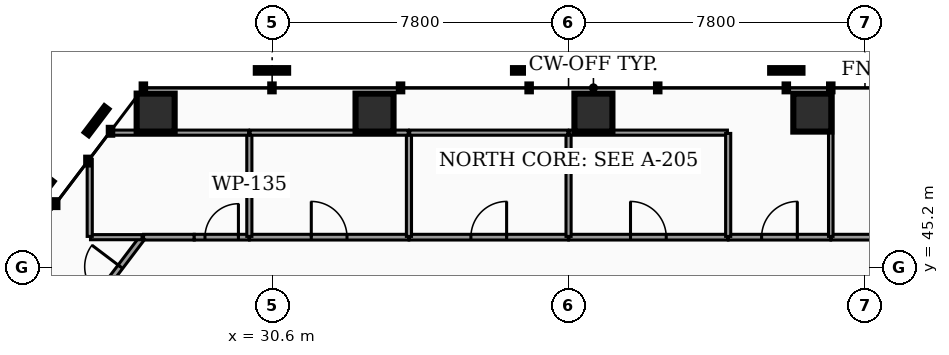
"""IFC4 building model, lengths in metres.
Left out: names, types, materials, properties, quantities, classifications, styles, units other than length and angle.
Written with IfcOpenShell. Run it as: python <this file> out.ifc"""

import sys

from ifc_helpers import new_model, si_unit, direction, frame, frame_2d, origin, origin_2d, place, context, subcontext, project, spatial, rectangle, hollow_rectangle, extrude, element, fill, save


model = new_model("IFC4")
c1 = context("Model", 3, precision=1e-05, world=origin(), true_north=direction((0.0, 1.0)))
c2 = subcontext(c1, "Body", "Model", "MODEL_VIEW")
j1 = project(units=[si_unit("LENGTHUNIT", "METRE"), si_unit("PLANEANGLEUNIT", "RADIAN")], contexts=[c1])
p1 = place(None, origin())
s1 = spatial("IfcSite", under=j1, at=p1, CompositionType="ELEMENT")
p2 = place(p1, origin())
s2 = spatial("IfcBuilding", under=s1, at=p2, CompositionType="ELEMENT")
p3 = place(p2, frame((0.0, 0.0, 60.18)))
s3 = spatial("IfcBuildingStorey", under=s2, at=p3, CompositionType="ELEMENT", Elevation=60.18)
p4 = place(p3, frame((44.814, 49.278, 0.0), z_axis=(0.06603544919, -0.030468093352, 0.997352001421), x_axis=(0.41894701377, 0.908010682565, 0.0)))
e1 = element("IfcColumn", 1, at=p4, inside=s3, PredefinedType="COLUMN", context=c2, shape_type="SweptSolid", body=[
    extrude(hollow_rectangle(XDim=1.0, YDim=1.0, WallThickness=0.05, at=origin_2d()), origin(), (0.0, 0.0, 1.0), 3.83),
])
p5 = place(p3, frame((39.054, 49.278, 0.0), z_axis=(-0.006004631848, -0.030534191739, 0.999515686486), x_axis=(0.981207200958, -0.192957064624, 0.0)))
e2 = element("IfcColumn", 2, at=p5, inside=s3, PredefinedType="COLUMN", context=c2, shape_type="SweptSolid", body=[
    extrude(hollow_rectangle(XDim=1.0, YDim=1.0, WallThickness=0.05, at=origin_2d()), origin(), (0.0, 0.0, 1.0), 3.822),
])
p6 = place(p3, frame((33.294, 49.278, 0.0), z_axis=(-0.078014761976, -0.030441678551, 0.996487331139), x_axis=(0.363510291576, -0.931590182386, 0.0)))
e3 = element("IfcColumn", 3, at=p6, inside=s3, PredefinedType="COLUMN", context=c2, shape_type="SweptSolid", body=[
    extrude(hollow_rectangle(XDim=1.0, YDim=1.0, WallThickness=0.05, at=origin_2d()), origin(), (0.0, 0.0, 1.0), 3.833),
])
p7 = place(p3, frame((27.534, 49.278, 0.0), z_axis=(-0.148702169179, -0.030195257803, 0.988420918075), x_axis=(0.198997452583, -0.980000007074, 0.0)))
e4 = element("IfcColumn", 4, at=p7, inside=s3, PredefinedType="COLUMN", context=c2, shape_type="SweptSolid", body=[
    extrude(hollow_rectangle(XDim=1.0, YDim=1.0, WallThickness=0.05, at=origin_2d()), origin(), (0.0, 0.0, 1.0), 3.865),
])
p8 = place(p3, frame((27.217, 46.0, 0.0), z_axis=(0.0, 0.0, 1.0), x_axis=(1.0, 0.0, 0.0)))
e5 = element("IfcWall", 5, at=p8, inside=s3, PredefinedType="PARTITIONING", context=c2, shape_type="SweptSolid", body=[
    extrude(rectangle(XDim=1.333, YDim=0.15, at=frame_2d((0.667, 0.0))), origin(), (0.0, 0.0, 1.0), 2.777),
])
p9 = place(p3, frame((28.55, 46.0, 0.0), z_axis=(0.0, 0.0, 1.0), x_axis=(1.0, 0.0, 0.0)))
e6 = element("IfcWall", 6, at=p9, inside=s3, PredefinedType="PARTITIONING", context=c2, shape_type="SweptSolid", body=[
    extrude(rectangle(XDim=1.445, YDim=0.15, at=frame_2d((0.723, 0.0))), origin(), (0.0, 0.0, 1.0), 2.777),
])
p10 = place(p9, frame((0.282, 0.0, 0.0)))
e7 = element("IfcOpeningElement", 7, at=p10, cuts=e6, PredefinedType="OPENING", context=c2, shape_type="SweptSolid", body=[
    extrude(rectangle(XDim=0.88, YDim=2.05, at=frame_2d((0.44, 1.025))), frame((0.0, 0.085, 0.0), z_axis=(0.0, -1.0, 0.0), x_axis=(1.0, 0.0, 0.0)), (0.0, 0.0, 1.0), 0.17),
])
p11 = place(p3, frame((30.005, 46.0, 0.0), z_axis=(0.0, 0.0, 1.0), x_axis=(1.0, 0.0, 0.0)))
e8 = element("IfcWall", 8, at=p11, inside=s3, PredefinedType="PARTITIONING", context=c2, shape_type="SweptSolid", body=[
    extrude(rectangle(XDim=4.19, YDim=0.15, at=frame_2d((2.095, 0.0))), origin(), (0.0, 0.0, 1.0), 2.777),
])
p12 = place(p11, frame((1.625, 0.0, 0.0)))
e9 = element("IfcOpeningElement", 9, at=p12, cuts=e8, PredefinedType="OPENING", context=c2, shape_type="SweptSolid", body=[
    extrude(rectangle(XDim=0.94, YDim=2.05, at=frame_2d((0.47, 1.025))), frame((0.0, 0.085, 0.0), z_axis=(0.0, -1.0, 0.0), x_axis=(1.0, 0.0, 0.0)), (0.0, 0.0, 1.0), 0.17),
])
p13 = place(p3, frame((34.205, 46.0, 0.0), z_axis=(0.0, 0.0, 1.0), x_axis=(1.0, 0.0, 0.0)))
e10 = element("IfcWall", 10, at=p13, inside=s3, PredefinedType="PARTITIONING", context=c2, shape_type="SweptSolid", body=[
    extrude(rectangle(XDim=4.19, YDim=0.15, at=frame_2d((2.095, 0.0))), origin(), (0.0, 0.0, 1.0), 2.777),
])
p14 = place(p13, frame((1.625, 0.0, 0.0)))
e11 = element("IfcOpeningElement", 11, at=p14, cuts=e10, PredefinedType="OPENING", context=c2, shape_type="SweptSolid", body=[
    extrude(rectangle(XDim=0.94, YDim=2.05, at=frame_2d((0.47, 1.025))), frame((0.0, 0.085, 0.0), z_axis=(0.0, -1.0, 0.0), x_axis=(1.0, 0.0, 0.0)), (0.0, 0.0, 1.0), 0.17),
])
p15 = place(p3, frame((38.405, 46.0, 0.0), z_axis=(0.0, 0.0, 1.0), x_axis=(1.0, 0.0, 0.0)))
e12 = element("IfcWall", 12, at=p15, inside=s3, PredefinedType="PARTITIONING", context=c2, shape_type="SweptSolid", body=[
    extrude(rectangle(XDim=4.19, YDim=0.15, at=frame_2d((2.095, 0.0))), origin(), (0.0, 0.0, 1.0), 2.777),
])
p16 = place(p15, frame((1.625, 0.0, 0.0)))
e13 = element("IfcOpeningElement", 13, at=p16, cuts=e12, PredefinedType="OPENING", context=c2, shape_type="SweptSolid", body=[
    extrude(rectangle(XDim=0.94, YDim=2.05, at=frame_2d((0.47, 1.025))), frame((0.0, 0.085, 0.0), z_axis=(0.0, -1.0, 0.0), x_axis=(1.0, 0.0, 0.0)), (0.0, 0.0, 1.0), 0.17),
])
p17 = place(p3, frame((25.462, 43.71, 0.0), z_axis=(0.0, 0.0, 1.0), x_axis=(0.603800014115, 0.797135837204, 0.0)))
e14 = element("IfcWall", 14, at=p17, inside=s3, PredefinedType="PARTITIONING", context=c2, shape_type="SweptSolid", body=[
    extrude(rectangle(XDim=2.853, YDim=0.15, at=frame_2d((1.426, 0.0))), origin(), (0.0, 0.0, 1.0), 2.777),
])
p18 = place(p17, frame((0.956, 0.0, 0.0)))
e15 = element("IfcOpeningElement", 15, at=p18, cuts=e14, PredefinedType="OPENING", context=c2, shape_type="SweptSolid", body=[
    extrude(rectangle(XDim=0.94, YDim=2.05, at=frame_2d((0.47, 1.025))), frame((0.0, 0.085, 0.0), z_axis=(0.0, -1.0, 0.0), x_axis=(1.0, 0.0, 0.0)), (0.0, 0.0, 1.0), 0.17),
])
p19 = place(p3, frame((45.305, 46.0, 0.0), z_axis=(0.0, 0.0, 1.0), x_axis=(1.0, 0.0, 0.0)))
e16 = element("IfcWall", 16, at=p19, inside=s3, PredefinedType="PARTITIONING", context=c2, shape_type="SweptSolid", body=[
    extrude(rectangle(XDim=3.045, YDim=0.15, at=frame_2d((1.522, 0.0))), origin(), (0.0, 0.0, 1.0), 2.777),
])
p20 = place(p3, frame((42.605, 46.0, 0.0), z_axis=(0.0, 0.0, 1.0), x_axis=(1.0, 0.0, 0.0)))
e17 = element("IfcWall", 17, at=p20, inside=s3, PredefinedType="PARTITIONING", context=c2, shape_type="SweptSolid", body=[
    extrude(rectangle(XDim=2.69, YDim=0.15, at=frame_2d((1.345, 0.0))), origin(), (0.0, 0.0, 1.0), 2.777),
])
p21 = place(p20, frame((0.875, 0.0, 0.0)))
e18 = element("IfcOpeningElement", 18, at=p21, cuts=e17, PredefinedType="OPENING", context=c2, shape_type="SweptSolid", body=[
    extrude(rectangle(XDim=0.94, YDim=2.05, at=frame_2d((0.47, 1.025))), frame((0.0, 0.085, 0.0), z_axis=(0.0, -1.0, 0.0), x_axis=(1.0, 0.0, 0.0)), (0.0, 0.0, 1.0), 0.17),
])
p22 = place(p3, frame((30.0, 46.02, 0.0), z_axis=(0.0, 0.0, 1.0), x_axis=(0.0, 1.0, 0.0)))
e19 = element("IfcWall", 19, at=p22, inside=s3, PredefinedType="PARTITIONING", context=c2, shape_type="SweptSolid", body=[
    extrude(rectangle(XDim=2.71, YDim=0.135, at=frame_2d((1.355, 0.0))), origin(), (0.0, 0.0, 1.0), 2.777),
])
p23 = place(p3, frame((25.82, 46.0, 0.0), z_axis=(0.0, 0.0, 1.0), x_axis=(1.0, 0.0, 0.0)))
e20 = element("IfcWall", 20, at=p23, inside=s3, PredefinedType="PARTITIONING", context=c2, shape_type="SweptSolid", body=[
    extrude(rectangle(XDim=1.356, YDim=0.135, at=frame_2d((0.678, 0.0))), origin(), (0.0, 0.0, 1.0), 2.777),
])
p24 = place(p3, frame((25.8, 46.02, 0.0), z_axis=(0.0, 0.0, 1.0), x_axis=(0.0, 1.0, 0.0)))
e21 = element("IfcWall", 21, at=p24, inside=s3, PredefinedType="PARTITIONING", context=c2, shape_type="SweptSolid", body=[
    extrude(rectangle(XDim=2.03, YDim=0.135, at=frame_2d((1.015, 0.0))), origin(), (0.0, 0.0, 1.0), 2.777),
])
p25 = place(p3, frame((26.334, 48.75, 0.0), z_axis=(0.0, 0.0, 1.0), x_axis=(1.0, 0.0, 0.0)))
e22 = element("IfcWall", 22, at=p25, inside=s3, PredefinedType="PARTITIONING", context=c2, shape_type="SweptSolid", body=[
    extrude(rectangle(XDim=3.646, YDim=0.135, at=frame_2d((1.823, 0.0))), origin(), (0.0, 0.0, 1.0), 2.777),
])
p26 = place(p3, frame((34.2, 46.02, 0.0), z_axis=(0.0, 0.0, 1.0), x_axis=(0.0, 1.0, 0.0)))
e23 = element("IfcWall", 23, at=p26, inside=s3, PredefinedType="PARTITIONING", context=c2, shape_type="SweptSolid", body=[
    extrude(rectangle(XDim=2.71, YDim=0.135, at=frame_2d((1.355, 0.0))), origin(), (0.0, 0.0, 1.0), 2.777),
])
p27 = place(p3, frame((30.02, 48.75, 0.0), z_axis=(0.0, 0.0, 1.0), x_axis=(1.0, 0.0, 0.0)))
e24 = element("IfcWall", 24, at=p27, inside=s3, PredefinedType="PARTITIONING", context=c2, shape_type="SweptSolid", body=[
    extrude(rectangle(XDim=4.16, YDim=0.135, at=frame_2d((2.08, 0.0))), origin(), (0.0, 0.0, 1.0), 2.777),
])
p28 = place(p3, frame((38.4, 46.02, 0.0), z_axis=(0.0, 0.0, 1.0), x_axis=(0.0, 1.0, 0.0)))
e25 = element("IfcWall", 25, at=p28, inside=s3, PredefinedType="PARTITIONING", context=c2, shape_type="SweptSolid", body=[
    extrude(rectangle(XDim=2.71, YDim=0.135, at=frame_2d((1.355, 0.0))), origin(), (0.0, 0.0, 1.0), 2.777),
])
p29 = place(p3, frame((34.22, 48.75, 0.0), z_axis=(0.0, 0.0, 1.0), x_axis=(1.0, 0.0, 0.0)))
e26 = element("IfcWall", 26, at=p29, inside=s3, PredefinedType="PARTITIONING", context=c2, shape_type="SweptSolid", body=[
    extrude(rectangle(XDim=4.16, YDim=0.135, at=frame_2d((2.08, 0.0))), origin(), (0.0, 0.0, 1.0), 2.777),
])
p30 = place(p3, frame((38.42, 48.75, 0.0), z_axis=(0.0, 0.0, 1.0), x_axis=(1.0, 0.0, 0.0)))
e27 = element("IfcWall", 27, at=p30, inside=s3, PredefinedType="PARTITIONING", context=c2, shape_type="SweptSolid", body=[
    extrude(rectangle(XDim=4.16, YDim=0.135, at=frame_2d((2.08, 0.0))), origin(), (0.0, 0.0, 1.0), 2.777),
])
p31 = place(p3, frame((42.6, 46.02, 0.0), z_axis=(0.0, 0.0, 1.0), x_axis=(0.0, 1.0, 0.0)))
e28 = element("IfcWall", 28, at=p31, inside=s3, PredefinedType="PARTITIONING", context=c2, shape_type="SweptSolid", body=[
    extrude(rectangle(XDim=2.71, YDim=0.135, at=frame_2d((1.355, 0.0))), origin(), (0.0, 0.0, 1.0), 2.777),
])
p32 = place(p3, frame((45.3, 46.02, 0.0), z_axis=(0.0, 0.0, 1.0), x_axis=(0.0, 1.0, 0.0)))
e29 = element("IfcWall", 29, at=p32, inside=s3, PredefinedType="PARTITIONING", context=c2, shape_type="SweptSolid", body=[
    extrude(rectangle(XDim=3.893, YDim=0.12, at=frame_2d((1.946, 0.0))), origin(), (0.0, 0.0, 1.0), 2.777),
])
p33 = place(p10, origin())
e30 = element("IfcDoor", 30, at=p33, inside=s3, OperationType="SINGLE_SWING_RIGHT", PredefinedType="DOOR", context=c2, shape_type="SweptSolid", body=[
    extrude(rectangle(XDim=0.88, YDim=2.05, at=frame_2d((0.44, 1.025))), frame((0.0, 0.025, 0.0), z_axis=(0.0, -1.0, 0.0), x_axis=(1.0, 0.0, 0.0)), (0.0, 0.0, 1.0), 0.05),
])
fill(e7, e30)
p34 = place(p12, origin())
e31 = element("IfcDoor", 31, at=p34, inside=s3, OperationType="SINGLE_SWING_LEFT", PredefinedType="DOOR", context=c2, shape_type="SweptSolid", body=[
    extrude(rectangle(XDim=0.94, YDim=2.05, at=frame_2d((0.47, 1.025))), frame((0.0, 0.025, 0.0), z_axis=(0.0, -1.0, 0.0), x_axis=(1.0, 0.0, 0.0)), (0.0, 0.0, 1.0), 0.05),
])
fill(e9, e31)
p35 = place(p14, origin())
e32 = element("IfcDoor", 32, at=p35, inside=s3, OperationType="SINGLE_SWING_RIGHT", PredefinedType="DOOR", context=c2, shape_type="SweptSolid", body=[
    extrude(rectangle(XDim=0.94, YDim=2.05, at=frame_2d((0.47, 1.025))), frame((0.0, 0.025, 0.0), z_axis=(0.0, -1.0, 0.0), x_axis=(1.0, 0.0, 0.0)), (0.0, 0.0, 1.0), 0.05),
])
fill(e11, e32)
p36 = place(p16, origin())
e33 = element("IfcDoor", 33, at=p36, inside=s3, OperationType="SINGLE_SWING_LEFT", PredefinedType="DOOR", context=c2, shape_type="SweptSolid", body=[
    extrude(rectangle(XDim=0.94, YDim=2.05, at=frame_2d((0.47, 1.025))), frame((0.0, 0.025, 0.0), z_axis=(0.0, -1.0, 0.0), x_axis=(1.0, 0.0, 0.0)), (0.0, 0.0, 1.0), 0.05),
])
fill(e13, e33)
p37 = place(p18, origin())
e34 = element("IfcDoor", 34, at=p37, inside=s3, OperationType="SINGLE_SWING_RIGHT", PredefinedType="DOOR", context=c2, shape_type="SweptSolid", body=[
    extrude(rectangle(XDim=0.94, YDim=2.05, at=frame_2d((0.47, 1.025))), frame((0.0, 0.025, 0.0), z_axis=(0.0, -1.0, 0.0), x_axis=(1.0, 0.0, 0.0)), (0.0, 0.0, 1.0), 0.05),
])
fill(e15, e34)
p38 = place(p21, origin())
e35 = element("IfcDoor", 35, at=p38, inside=s3, OperationType="SINGLE_SWING_RIGHT", PredefinedType="DOOR", context=c2, shape_type="SweptSolid", body=[
    extrude(rectangle(XDim=0.94, YDim=2.05, at=frame_2d((0.47, 1.025))), frame((0.0, 0.025, 0.0), z_axis=(0.0, -1.0, 0.0), x_axis=(1.0, 0.0, 0.0)), (0.0, 0.0, 1.0), 0.05),
])
fill(e18, e35)
save(model, sys.argv[1])
